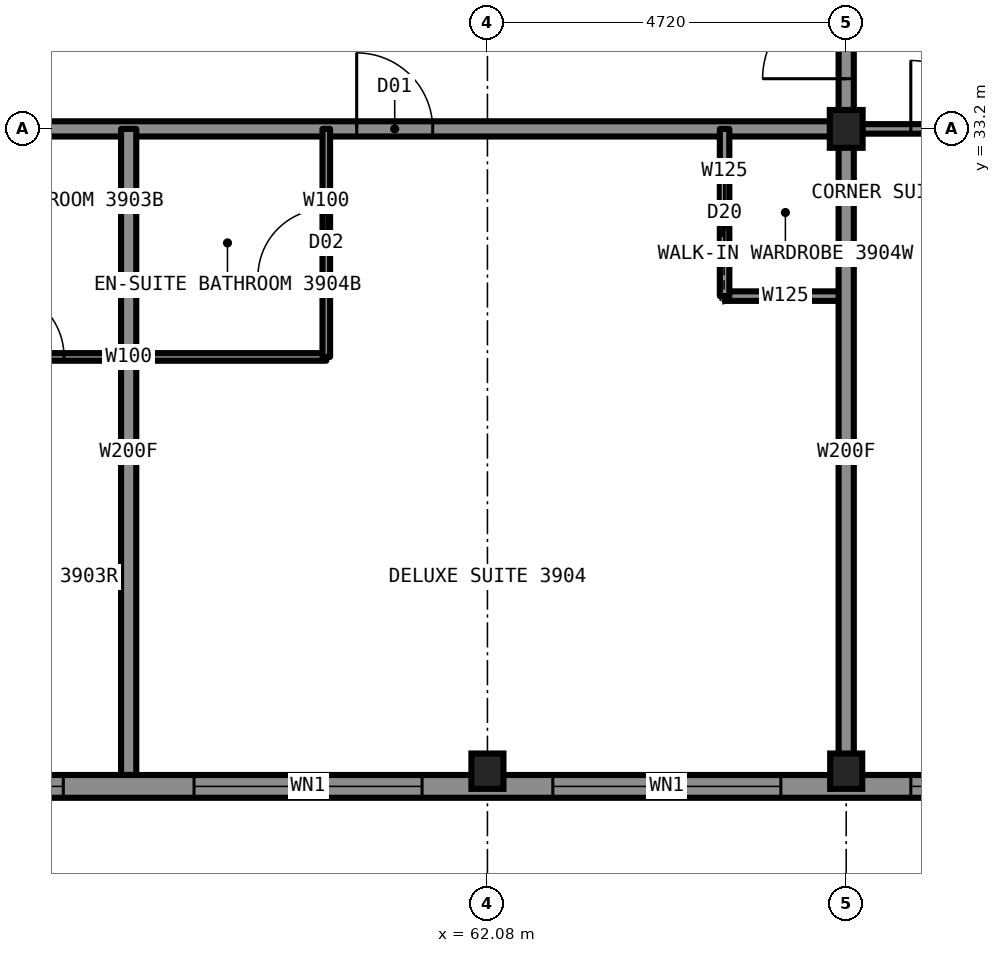
"""IFC4 building model, lengths in metres.
Left out: names, types, materials, properties, quantities, classifications, styles, units other than length and angle.
Written with IfcOpenShell. Run it as: python <this file> out.ifc"""

import sys

from ifc_helpers import new_model, si_unit, direction, frame, frame_2d, origin, origin_2d, place, context, subcontext, project, spatial, rectangle, i_section, extrude, element, fill, save


model = new_model("IFC4")
c1 = context("Model", 3, precision=1e-05, world=origin(), true_north=direction((0.0, 1.0)))
c2 = subcontext(c1, "Body", "Model", "MODEL_VIEW")
j1 = project(units=[si_unit("LENGTHUNIT", "METRE"), si_unit("PLANEANGLEUNIT", "RADIAN")], contexts=[c1])
p1 = place(None, origin())
s1 = spatial("IfcSite", under=j1, at=p1, CompositionType="ELEMENT")
p2 = place(p1, origin())
s2 = spatial("IfcBuilding", under=s1, at=p2, CompositionType="ELEMENT")
p3 = place(p2, frame((0.0, 0.0, 145.9)))
s3 = spatial("IfcBuildingStorey", under=s2, at=p3, CompositionType="ELEMENT", Elevation=145.9)
for number, where, z_axis, x_axis in (
    (1, (62.08, 24.75, 0.0), (0.0, 0.0, 1.0), (1.0, 0.0, 0.0)),
    (2, (66.8, 24.75, 0.0), (0.0, 0.0, 1.0), (1.0, 0.0, 0.0)),
):
    element("IfcColumn", number, at=place(p3, frame(where, z_axis=z_axis, x_axis=x_axis)), inside=s3, PredefinedType="COLUMN", context=c2, shape_type="SweptSolid", body=[
        extrude(i_section(OverallWidth=0.422, OverallDepth=0.465, WebThickness=0.045, FlangeThickness=0.073, at=origin_2d()), origin(), (0.0, 0.0, 1.0), 3.5),
    ])
p4 = place(p3, frame((66.8, 33.2, 0.0), z_axis=(0.0, 0.0, 1.0), x_axis=(1.0, 0.0, 0.0)))
e3 = element("IfcColumn", 3, at=p4, inside=s3, PredefinedType="COLUMN", context=c2, shape_type="SweptSolid", body=[
    extrude(i_section(OverallWidth=0.432, OverallDepth=0.498, WebThickness=0.056, FlangeThickness=0.089, at=origin_2d()), origin(), (0.0, 0.0, 1.0), 3.5),
])
p5 = place(p3, frame((43.2, 33.2, 0.0), z_axis=(0.0, 0.0, 1.0), x_axis=(1.0, 0.0, 0.0)))
e4 = element("IfcWall", 4, at=p5, inside=s3, PredefinedType="PARTITIONING", context=c2, shape_type="SweptSolid", body=[
    extrude(rectangle(XDim=23.6, YDim=0.2, at=frame_2d((11.8, 0.0))), origin(), (0.0, 0.0, 1.0), 3.33),
])
p6 = place(p5, frame((1.85, 0.0, 0.0)))
e5 = element("IfcOpeningElement", 5, at=p6, cuts=e4, PredefinedType="OPENING", context=c2, shape_type="SweptSolid", body=[
    extrude(rectangle(XDim=1.1, YDim=2.2, at=frame_2d((0.55, 1.1))), frame((0.0, 0.11, 0.0), z_axis=(0.0, -1.0, 0.0), x_axis=(1.0, 0.0, 0.0)), (0.0, 0.0, 1.0), 0.22),
])
p7 = place(p5, frame((17.16, 0.0, 0.0)))
e6 = element("IfcOpeningElement", 6, at=p7, cuts=e4, PredefinedType="OPENING", context=c2, shape_type="SweptSolid", body=[
    extrude(rectangle(XDim=1.0, YDim=2.2, at=frame_2d((0.5, 1.1))), frame((0.0, 0.11, 0.0), z_axis=(0.0, -1.0, 0.0), x_axis=(1.0, 0.0, 0.0)), (0.0, 0.0, 1.0), 0.22),
])
p8 = place(p3, frame((66.8, 33.2, 0.0), z_axis=(0.0, 0.0, 1.0), x_axis=(1.0, 0.0, 0.0)))
e7 = element("IfcWall", 7, at=p8, inside=s3, PredefinedType="PARTITIONING", context=c2, shape_type="SweptSolid", body=[
    extrude(rectangle(XDim=8.5, YDim=0.125, at=frame_2d((4.25, 0.0))), origin(), (0.0, 0.0, 1.0), 2.573),
])
p9 = place(p8, frame((0.85, 0.0, 0.0)))
e8 = element("IfcOpeningElement", 8, at=p9, cuts=e7, PredefinedType="OPENING", context=c2, shape_type="SweptSolid", body=[
    extrude(rectangle(XDim=0.9, YDim=2.2, at=frame_2d((0.45, 1.1))), frame((0.0, 0.073, 0.0), z_axis=(0.0, -1.0, 0.0), x_axis=(1.0, 0.0, 0.0)), (0.0, 0.0, 1.0), 0.145),
])
p10 = place(p3, frame((65.2, 31.0, 0.0), z_axis=(0.0, 0.0, 1.0), x_axis=(1.0, 0.0, 0.0)))
e9 = element("IfcWall", 9, at=p10, inside=s3, PredefinedType="PARTITIONING", context=c2, shape_type="SweptSolid", body=[
    extrude(rectangle(XDim=1.6, YDim=0.125, at=frame_2d((0.8, 0.0))), origin(), (0.0, 0.0, 1.0), 3.33),
])
p11 = place(p3, frame((54.76, 30.2, 0.0), z_axis=(0.0, 0.0, 1.0), x_axis=(1.0, 0.0, 0.0)))
e10 = element("IfcWall", 10, at=p11, inside=s3, PredefinedType="PARTITIONING", context=c2, shape_type="SweptSolid", body=[
    extrude(rectangle(XDim=5.2, YDim=0.1, at=frame_2d((2.6, 0.0))), origin(), (0.0, 0.0, 1.0), 3.33),
])
p12 = place(p11, frame((0.85, 0.0, 0.0)))
e11 = element("IfcOpeningElement", 11, at=p12, cuts=e10, PredefinedType="OPENING", context=c2, shape_type="SweptSolid", body=[
    extrude(rectangle(XDim=0.9, YDim=2.1, at=frame_2d((0.45, 1.05))), frame((0.0, 0.06, 0.0), z_axis=(0.0, -1.0, 0.0), x_axis=(1.0, 0.0, 0.0)), (0.0, 0.0, 1.0), 0.12),
])
p13 = place(p3, frame((65.2, 31.0, 0.0), z_axis=(0.0, 0.0, 1.0), x_axis=(0.0, 1.0, 0.0)))
e12 = element("IfcWall", 12, at=p13, inside=s3, PredefinedType="PARTITIONING", context=c2, shape_type="SweptSolid", body=[
    extrude(rectangle(XDim=2.2, YDim=0.125, at=frame_2d((1.1, 0.0))), origin(), (0.0, 0.0, 1.0), 3.33),
])
p14 = place(p13, frame((0.7, 0.0, 0.0)))
e13 = element("IfcOpeningElement", 13, at=p14, cuts=e12, PredefinedType="OPENING", context=c2, shape_type="SweptSolid", body=[
    extrude(rectangle(XDim=0.8, YDim=2.1, at=frame_2d((0.4, 1.05))), frame((0.0, 0.073, 0.0), z_axis=(0.0, -1.0, 0.0), x_axis=(1.0, 0.0, 0.0)), (0.0, 0.0, 1.0), 0.145),
])
p15 = place(p3, frame((66.8, 33.2, 0.0), z_axis=(0.0, 0.0, 1.0), x_axis=(0.0, 1.0, 0.0)))
e14 = element("IfcWall", 14, at=p15, inside=s3, PredefinedType="PARTITIONING", context=c2, shape_type="SweptSolid", body=[
    extrude(rectangle(XDim=23.6, YDim=0.2, at=frame_2d((11.8, 0.0))), origin(), (0.0, 0.0, 1.0), 3.33),
])
p16 = place(p15, frame((7.87, 0.0, 0.0)))
e15 = element("IfcOpeningElement", 15, at=p16, cuts=e14, PredefinedType="OPENING", context=c2, shape_type="SweptSolid", body=[
    extrude(rectangle(XDim=1.0, YDim=2.2, at=frame_2d((0.5, 1.1))), frame((0.0, 0.11, 0.0), z_axis=(0.0, -1.0, 0.0), x_axis=(1.0, 0.0, 0.0)), (0.0, 0.0, 1.0), 0.22),
])
p17 = place(p15, frame((11.7, 0.0, 0.0)))
e16 = element("IfcOpeningElement", 16, at=p17, cuts=e14, PredefinedType="OPENING", context=c2, shape_type="SweptSolid", body=[
    extrude(rectangle(XDim=1.0, YDim=2.2, at=frame_2d((0.5, 1.1))), frame((0.0, 0.11, 0.0), z_axis=(0.0, -1.0, 0.0), x_axis=(1.0, 0.0, 0.0)), (0.0, 0.0, 1.0), 0.22),
])
p18 = place(p15, frame((14.56, 0.0, 0.0)))
e17 = element("IfcOpeningElement", 17, at=p18, cuts=e14, PredefinedType="OPENING", context=c2, shape_type="SweptSolid", body=[
    extrude(rectangle(XDim=1.0, YDim=2.2, at=frame_2d((0.5, 1.1))), frame((0.0, 0.11, 0.0), z_axis=(0.0, -1.0, 0.0), x_axis=(1.0, 0.0, 0.0)), (0.0, 0.0, 1.0), 0.22),
])
p19 = place(p15, frame((21.84, 0.0, 0.0)))
e18 = element("IfcOpeningElement", 18, at=p19, cuts=e14, PredefinedType="OPENING", context=c2, shape_type="SweptSolid", body=[
    extrude(rectangle(XDim=1.1, YDim=2.2, at=frame_2d((0.55, 1.1))), frame((0.0, 0.11, 0.0), z_axis=(0.0, -1.0, 0.0), x_axis=(1.0, 0.0, 0.0)), (0.0, 0.0, 1.0), 0.22),
])
p20 = place(p15, frame((0.66, 0.0, 0.0)))
e19 = element("IfcOpeningElement", 19, at=p20, cuts=e14, PredefinedType="OPENING", context=c2, shape_type="SweptSolid", body=[
    extrude(rectangle(XDim=1.1, YDim=2.2, at=frame_2d((0.55, 1.1))), frame((0.0, 0.11, 0.0), z_axis=(0.0, -1.0, 0.0), x_axis=(1.0, 0.0, 0.0)), (0.0, 0.0, 1.0), 0.22),
])
p21 = place(p3, frame((66.8, 24.7, 0.0), z_axis=(0.0, 0.0, 1.0), x_axis=(0.0, 1.0, 0.0)))
e20 = element("IfcWall", 20, at=p21, inside=s3, PredefinedType="PARTITIONING", context=c2, shape_type="SweptSolid", body=[
    extrude(rectangle(XDim=8.5, YDim=0.2, at=frame_2d((4.25, 0.0))), origin(), (0.0, 0.0, 1.0), 2.573),
])
p22 = place(p3, frame((57.36, 24.7, 0.0), z_axis=(0.0, 0.0, 1.0), x_axis=(0.0, 1.0, 0.0)))
e21 = element("IfcWall", 21, at=p22, inside=s3, PredefinedType="PARTITIONING", context=c2, shape_type="SweptSolid", body=[
    extrude(rectangle(XDim=8.5, YDim=0.2, at=frame_2d((4.25, 0.0))), origin(), (0.0, 0.0, 1.0), 3.33),
])
p23 = place(p3, frame((59.96, 30.2, 0.0), z_axis=(0.0, 0.0, 1.0), x_axis=(0.0, 1.0, 0.0)))
e22 = element("IfcWall", 22, at=p23, inside=s3, PredefinedType="PARTITIONING", context=c2, shape_type="SweptSolid", body=[
    extrude(rectangle(XDim=3.0, YDim=0.1, at=frame_2d((1.5, 0.0))), origin(), (0.0, 0.0, 1.0), 3.33),
])
p24 = place(p23, frame((1.05, 0.0, 0.0)))
e23 = element("IfcOpeningElement", 23, at=p24, cuts=e22, PredefinedType="OPENING", context=c2, shape_type="SweptSolid", body=[
    extrude(rectangle(XDim=0.9, YDim=2.1, at=frame_2d((0.45, 1.05))), frame((0.0, 0.06, 0.0), z_axis=(0.0, -1.0, 0.0), x_axis=(1.0, 0.0, 0.0)), (0.0, 0.0, 1.0), 0.12),
])
p25 = place(p3, frame((39.9, 24.55, 0.0), z_axis=(0.0, 0.0, 1.0), x_axis=(1.0, 0.0, 0.0)))
e24 = element("IfcWall", 24, at=p25, inside=s3, PredefinedType="SOLIDWALL", context=c2, shape_type="SweptSolid", body=[
    extrude(rectangle(XDim=30.2, YDim=0.3, at=frame_2d((15.1, 0.0))), origin(), (0.0, 0.0, 1.0), 2.83),
])
p26 = place(p25, frame((1.3, 0.0, 0.8)))
e25 = element("IfcOpeningElement", 25, at=p26, cuts=e24, PredefinedType="OPENING", context=c2, shape_type="SweptSolid", body=[
    extrude(rectangle(XDim=1.1, YDim=1.7, at=frame_2d((0.55, 0.85))), frame((0.0, 0.16, 0.0), z_axis=(0.0, -1.0, 0.0), x_axis=(1.0, 0.0, 0.0)), (0.0, 0.0, 1.0), 0.32),
])
p27 = place(p25, frame((4.16, 0.0, 0.5)))
e26 = element("IfcOpeningElement", 26, at=p27, cuts=e24, PredefinedType="OPENING", context=c2, shape_type="SweptSolid", body=[
    extrude(rectangle(XDim=3.0, YDim=2.0, at=frame_2d((1.5, 1.0))), frame((0.0, 0.16, 0.0), z_axis=(0.0, -1.0, 0.0), x_axis=(1.0, 0.0, 0.0)), (0.0, 0.0, 1.0), 0.32),
])
p28 = place(p25, frame((8.88, 0.0, 0.5)))
e27 = element("IfcOpeningElement", 27, at=p28, cuts=e24, PredefinedType="OPENING", context=c2, shape_type="SweptSolid", body=[
    extrude(rectangle(XDim=3.0, YDim=2.0, at=frame_2d((1.5, 1.0))), frame((0.0, 0.16, 0.0), z_axis=(0.0, -1.0, 0.0), x_axis=(1.0, 0.0, 0.0)), (0.0, 0.0, 1.0), 0.32),
])
p29 = place(p25, frame((13.6, 0.0, 0.5)))
e28 = element("IfcOpeningElement", 28, at=p29, cuts=e24, PredefinedType="OPENING", context=c2, shape_type="SweptSolid", body=[
    extrude(rectangle(XDim=3.0, YDim=2.0, at=frame_2d((1.5, 1.0))), frame((0.0, 0.16, 0.0), z_axis=(0.0, -1.0, 0.0), x_axis=(1.0, 0.0, 0.0)), (0.0, 0.0, 1.0), 0.32),
])
p30 = place(p25, frame((18.32, 0.0, 0.5)))
e29 = element("IfcOpeningElement", 29, at=p30, cuts=e24, PredefinedType="OPENING", context=c2, shape_type="SweptSolid", body=[
    extrude(rectangle(XDim=3.0, YDim=2.0, at=frame_2d((1.5, 1.0))), frame((0.0, 0.16, 0.0), z_axis=(0.0, -1.0, 0.0), x_axis=(1.0, 0.0, 0.0)), (0.0, 0.0, 1.0), 0.32),
])
p31 = place(p25, frame((23.04, 0.0, 0.5)))
e30 = element("IfcOpeningElement", 30, at=p31, cuts=e24, PredefinedType="OPENING", context=c2, shape_type="SweptSolid", body=[
    extrude(rectangle(XDim=3.0, YDim=2.0, at=frame_2d((1.5, 1.0))), frame((0.0, 0.16, 0.0), z_axis=(0.0, -1.0, 0.0), x_axis=(1.0, 0.0, 0.0)), (0.0, 0.0, 1.0), 0.32),
])
p32 = place(p25, frame((27.75, 0.0, 0.8)))
e31 = element("IfcOpeningElement", 31, at=p32, cuts=e24, PredefinedType="OPENING", context=c2, shape_type="SweptSolid", body=[
    extrude(rectangle(XDim=1.1, YDim=1.7, at=frame_2d((0.55, 0.85))), frame((0.0, 0.16, 0.0), z_axis=(0.0, -1.0, 0.0), x_axis=(1.0, 0.0, 0.0)), (0.0, 0.0, 1.0), 0.32),
])
p33 = place(p12, origin())
e32 = element("IfcDoor", 32, at=p33, inside=s3, OperationType="SINGLE_SWING_RIGHT", PredefinedType="DOOR", context=c2, shape_type="SweptSolid", body=[
    extrude(rectangle(XDim=0.9, YDim=2.1, at=frame_2d((0.45, 1.05))), frame((0.0, 0.025, 0.0), z_axis=(0.0, -1.0, 0.0), x_axis=(1.0, 0.0, 0.0)), (0.0, 0.0, 1.0), 0.05),
])
fill(e11, e32)
p34 = place(p7, origin())
e33 = element("IfcDoor", 33, at=p34, inside=s3, OperationType="SINGLE_SWING_LEFT", PredefinedType="DOOR", context=c2, shape_type="SweptSolid", body=[
    extrude(rectangle(XDim=1.0, YDim=2.2, at=frame_2d((0.5, 1.1))), frame((0.0, 0.025, 0.0), z_axis=(0.0, -1.0, 0.0), x_axis=(1.0, 0.0, 0.0)), (0.0, 0.0, 1.0), 0.05),
])
fill(e6, e33)
p35 = place(p24, origin())
e34 = element("IfcDoor", 34, at=p35, inside=s3, OperationType="SINGLE_SWING_RIGHT", PredefinedType="DOOR", context=c2, shape_type="SweptSolid", body=[
    extrude(rectangle(XDim=0.9, YDim=2.1, at=frame_2d((0.45, 1.05))), frame((0.0, 0.025, 0.0), z_axis=(0.0, -1.0, 0.0), x_axis=(1.0, 0.0, 0.0)), (0.0, 0.0, 1.0), 0.05),
])
fill(e23, e34)
p36 = place(p14, origin())
e35 = element("IfcDoor", 35, at=p36, inside=s3, OperationType="SLIDING_TO_LEFT", PredefinedType="DOOR", context=c2, shape_type="SweptSolid", body=[
    extrude(rectangle(XDim=0.8, YDim=2.1, at=frame_2d((0.4, 1.05))), frame((0.0, 0.025, 0.0), z_axis=(0.0, -1.0, 0.0), x_axis=(1.0, 0.0, 0.0)), (0.0, 0.0, 1.0), 0.05),
])
fill(e13, e35)
p37 = place(p9, origin())
e36 = element("IfcDoor", 36, at=p37, inside=s3, OperationType="SINGLE_SWING_LEFT", PredefinedType="DOOR", context=c2, shape_type="SweptSolid", body=[
    extrude(rectangle(XDim=0.9, YDim=2.2, at=frame_2d((0.45, 1.1))), frame((0.0, 0.025, 0.0), z_axis=(0.0, -1.0, 0.0), x_axis=(1.0, 0.0, 0.0)), (0.0, 0.0, 1.0), 0.05),
])
fill(e8, e36)
p38 = place(p20, origin())
e37 = element("IfcDoor", 37, at=p38, inside=s3, OperationType="SINGLE_SWING_LEFT", PredefinedType="DOOR", context=c2, shape_type="SweptSolid", body=[
    extrude(rectangle(XDim=1.1, YDim=2.2, at=frame_2d((0.55, 1.1))), frame((0.0, 0.025, 0.0), z_axis=(0.0, -1.0, 0.0), x_axis=(1.0, 0.0, 0.0)), (0.0, 0.0, 1.0), 0.05),
])
fill(e19, e37)
p39 = place(p29, origin())
e38 = element("IfcWindow", 38, at=p39, inside=s3, PartitioningType="SINGLE_PANEL", PredefinedType="WINDOW", context=c2, shape_type="SweptSolid", body=[
    extrude(rectangle(XDim=3.0, YDim=2.0, at=frame_2d((1.5, 1.0))), frame((0.0, 0.03, 0.0), z_axis=(0.0, -1.0, 0.0), x_axis=(1.0, 0.0, 0.0)), (0.0, 0.0, 1.0), 0.06),
])
fill(e28, e38)
p40 = place(p30, origin())
e39 = element("IfcWindow", 39, at=p40, inside=s3, PartitioningType="SINGLE_PANEL", PredefinedType="WINDOW", context=c2, shape_type="SweptSolid", body=[
    extrude(rectangle(XDim=3.0, YDim=2.0, at=frame_2d((1.5, 1.0))), frame((0.0, 0.03, 0.0), z_axis=(0.0, -1.0, 0.0), x_axis=(1.0, 0.0, 0.0)), (0.0, 0.0, 1.0), 0.06),
])
fill(e29, e39)
p41 = place(p31, origin())
e40 = element("IfcWindow", 40, at=p41, inside=s3, PartitioningType="SINGLE_PANEL", PredefinedType="WINDOW", context=c2, shape_type="SweptSolid", body=[
    extrude(rectangle(XDim=3.0, YDim=2.0, at=frame_2d((1.5, 1.0))), frame((0.0, 0.03, 0.0), z_axis=(0.0, -1.0, 0.0), x_axis=(1.0, 0.0, 0.0)), (0.0, 0.0, 1.0), 0.06),
])
fill(e30, e40)
p42 = place(p32, origin())
e41 = element("IfcWindow", 41, at=p42, inside=s3, PartitioningType="SINGLE_PANEL", PredefinedType="WINDOW", context=c2, shape_type="SweptSolid", body=[
    extrude(rectangle(XDim=1.1, YDim=1.7, at=frame_2d((0.55, 0.85))), frame((0.0, 0.03, 0.0), z_axis=(0.0, -1.0, 0.0), x_axis=(1.0, 0.0, 0.0)), (0.0, 0.0, 1.0), 0.06),
])
fill(e31, e41)
save(model, sys.argv[1])
